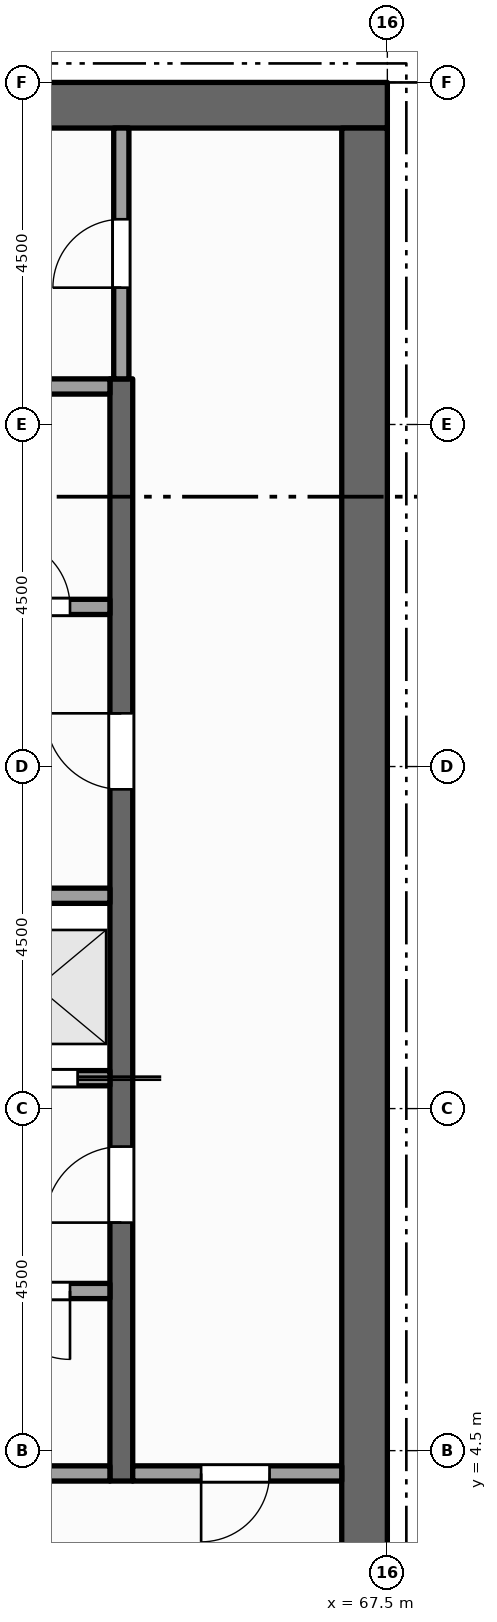
"""IFC4 building model, lengths in metres.
Left out: names, types, materials, properties, quantities, classifications, styles, units other than length and angle.
Written with IfcOpenShell. Run it as: python <this file> out.ifc"""

import sys

from ifc_helpers import new_model, si_unit, direction, frame, frame_2d, origin, place, context, subcontext, project, spatial, rectangle, extrude, element, fill, save


model = new_model("IFC4")
c1 = context("Model", 3, precision=1e-05, world=origin(), true_north=direction((0.0, 1.0)))
c2 = subcontext(c1, "Body", "Model", "MODEL_VIEW")
j1 = project(units=[si_unit("LENGTHUNIT", "METRE"), si_unit("PLANEANGLEUNIT", "RADIAN")], contexts=[c1])
p1 = place(None, origin())
s1 = spatial("IfcSite", under=j1, at=p1, CompositionType="ELEMENT")
p2 = place(p1, origin())
s2 = spatial("IfcBuilding", under=s1, at=p2, CompositionType="ELEMENT")
p3 = place(p2, frame((0.0, 0.0, 341.0)))
s3 = spatial("IfcBuildingStorey", under=s2, at=p3, CompositionType="ELEMENT", Elevation=341.0)
p4 = place(p3, frame((54.0, 22.2, -0.15), z_axis=(0.0, 0.0, 1.0), x_axis=(1.0, 0.0, 0.0)))
e1 = element("IfcWall", 1, at=p4, inside=s3, PredefinedType="SHEAR", context=c2, shape_type="SweptSolid", body=[
    extrude(rectangle(XDim=13.5, YDim=0.6, at=frame_2d((6.75, 0.0))), origin(), (0.0, 0.0, 1.0), 4.5),
])
p5 = place(p3, frame((67.2, 0.6, -0.15), z_axis=(0.0, 0.0, 1.0), x_axis=(0.0, 1.0, 0.0)))
e2 = element("IfcWall", 2, at=p5, inside=s3, PredefinedType="SHEAR", context=c2, shape_type="SweptSolid", body=[
    extrude(rectangle(XDim=21.3, YDim=0.6, at=frame_2d((10.65, 0.0))), origin(), (0.0, 0.0, 1.0), 4.5),
])
p6 = place(p3, frame((64.0, 4.1, 0.0), z_axis=(0.0, 0.0, 1.0), x_axis=(0.0, 1.0, 0.0)))
e3 = element("IfcWall", 3, at=p6, inside=s3, PredefinedType="SHEAR", context=c2, shape_type="SweptSolid", body=[
    extrude(rectangle(XDim=14.5, YDim=0.3, at=frame_2d((7.25, 0.0))), origin(), (0.0, 0.0, 1.0), 4.3),
])
p7 = place(p6, frame((3.4, 0.0, 0.0)))
e4 = element("IfcOpeningElement", 4, at=p7, cuts=e3, PredefinedType="OPENING", context=c2, shape_type="SweptSolid", body=[
    extrude(rectangle(XDim=1.0, YDim=2.1, at=frame_2d((0.5, 1.05))), frame((0.0, 0.16, 0.0), z_axis=(0.0, -1.0, 0.0), x_axis=(1.0, 0.0, 0.0)), (0.0, 0.0, 1.0), 0.32),
])
p8 = place(p6, frame((9.1, 0.0, 0.0)))
e5 = element("IfcOpeningElement", 5, at=p8, cuts=e3, PredefinedType="OPENING", context=c2, shape_type="SweptSolid", body=[
    extrude(rectangle(XDim=1.0, YDim=2.1, at=frame_2d((0.5, 1.05))), frame((0.0, 0.16, 0.0), z_axis=(0.0, -1.0, 0.0), x_axis=(1.0, 0.0, 0.0)), (0.0, 0.0, 1.0), 0.32),
])
p9 = place(p3, frame((64.0, 18.6, 0.0), z_axis=(0.0, 0.0, 1.0), x_axis=(0.0, 1.0, 0.0)))
e6 = element("IfcWall", 6, at=p9, inside=s3, PredefinedType="PARTITIONING", context=c2, shape_type="SweptSolid", body=[
    extrude(rectangle(XDim=3.3, YDim=0.2, at=frame_2d((1.65, 0.0))), origin(), (0.0, 0.0, 1.0), 4.3),
])
p10 = place(p9, frame((1.2, 0.0, 0.0)))
e7 = element("IfcOpeningElement", 7, at=p10, cuts=e6, PredefinedType="OPENING", context=c2, shape_type="SweptSolid", body=[
    extrude(rectangle(XDim=0.9, YDim=2.1, at=frame_2d((0.45, 1.05))), frame((0.0, 0.11, 0.0), z_axis=(0.0, -1.0, 0.0), x_axis=(1.0, 0.0, 0.0)), (0.0, 0.0, 1.0), 0.22),
])
p11 = place(p3, frame((61.9, 4.2, 0.0), z_axis=(0.0, 0.0, 1.0), x_axis=(1.0, 0.0, 0.0)))
e8 = element("IfcWall", 8, at=p11, inside=s3, PredefinedType="PARTITIONING", context=c2, shape_type="SweptSolid", body=[
    extrude(rectangle(XDim=1.95, YDim=0.2, at=frame_2d((0.975, 0.0))), origin(), (0.0, 0.0, 1.0), 4.3),
])
p12 = place(p3, frame((64.15, 4.2, 0.0), z_axis=(0.0, 0.0, 1.0), x_axis=(1.0, 0.0, 0.0)))
e9 = element("IfcWall", 9, at=p12, inside=s3, PredefinedType="PARTITIONING", context=c2, shape_type="SweptSolid", body=[
    extrude(rectangle(XDim=2.75, YDim=0.2, at=frame_2d((1.375, 0.0))), origin(), (0.0, 0.0, 1.0), 4.3),
])
p13 = place(p12, frame((0.9, 0.0, 0.0)))
e10 = element("IfcOpeningElement", 10, at=p13, cuts=e9, PredefinedType="OPENING", context=c2, shape_type="SweptSolid", body=[
    extrude(rectangle(XDim=0.9, YDim=2.1, at=frame_2d((0.45, 1.05))), frame((0.0, 0.11, 0.0), z_axis=(0.0, -1.0, 0.0), x_axis=(1.0, 0.0, 0.0)), (0.0, 0.0, 1.0), 0.22),
])
p14 = place(p3, frame((61.9, 6.6, 0.0), z_axis=(0.0, 0.0, 1.0), x_axis=(1.0, 0.0, 0.0)))
e11 = element("IfcWall", 11, at=p14, inside=s3, PredefinedType="PARTITIONING", context=c2, shape_type="SweptSolid", body=[
    extrude(rectangle(XDim=1.95, YDim=0.2, at=frame_2d((0.975, 0.0))), origin(), (0.0, 0.0, 1.0), 4.3),
])
p15 = place(p14, frame((0.525, 0.0, 0.0)))
e12 = element("IfcOpeningElement", 12, at=p15, cuts=e11, PredefinedType="OPENING", context=c2, shape_type="SweptSolid", body=[
    extrude(rectangle(XDim=0.9, YDim=2.1, at=frame_2d((0.45, 1.05))), frame((0.0, 0.11, 0.0), z_axis=(0.0, -1.0, 0.0), x_axis=(1.0, 0.0, 0.0)), (0.0, 0.0, 1.0), 0.22),
])
p16 = place(p3, frame((61.9, 9.4, 0.0), z_axis=(0.0, 0.0, 1.0), x_axis=(1.0, 0.0, 0.0)))
e13 = element("IfcWall", 13, at=p16, inside=s3, PredefinedType="SOLIDWALL", context=c2, shape_type="SweptSolid", body=[
    extrude(rectangle(XDim=1.95, YDim=0.2, at=frame_2d((0.975, 0.0))), origin(), (0.0, 0.0, 1.0), 4.3),
])
p17 = place(p16, frame((0.425, 0.0, 0.012)))
e14 = element("IfcOpeningElement", 14, at=p17, cuts=e13, PredefinedType="OPENING", context=c2, shape_type="SweptSolid", body=[
    extrude(rectangle(XDim=1.1, YDim=2.1, at=frame_2d((0.55, 1.05))), frame((0.0, 0.11, 0.0), z_axis=(0.0, -1.0, 0.0), x_axis=(1.0, 0.0, 0.0)), (0.0, 0.0, 1.0), 0.22),
])
p18 = place(p3, frame((61.9, 11.8, 0.0), z_axis=(0.0, 0.0, 1.0), x_axis=(1.0, 0.0, 0.0)))
e15 = element("IfcWall", 15, at=p18, inside=s3, PredefinedType="SOLIDWALL", context=c2, shape_type="SweptSolid", body=[
    extrude(rectangle(XDim=1.95, YDim=0.2, at=frame_2d((0.975, 0.0))), origin(), (0.0, 0.0, 1.0), 4.3),
])
p19 = place(p3, frame((61.9, 15.6, 0.0), z_axis=(0.0, 0.0, 1.0), x_axis=(1.0, 0.0, 0.0)))
e16 = element("IfcWall", 16, at=p19, inside=s3, PredefinedType="PARTITIONING", context=c2, shape_type="SweptSolid", body=[
    extrude(rectangle(XDim=1.95, YDim=0.2, at=frame_2d((0.975, 0.0))), origin(), (0.0, 0.0, 1.0), 4.3),
])
p20 = place(p19, frame((0.525, 0.0, 0.0)))
e17 = element("IfcOpeningElement", 17, at=p20, cuts=e16, PredefinedType="OPENING", context=c2, shape_type="SweptSolid", body=[
    extrude(rectangle(XDim=0.9, YDim=2.1, at=frame_2d((0.45, 1.05))), frame((0.0, 0.11, 0.0), z_axis=(0.0, -1.0, 0.0), x_axis=(1.0, 0.0, 0.0)), (0.0, 0.0, 1.0), 0.22),
])
p21 = place(p3, frame((61.9, 18.5, 0.0), z_axis=(0.0, 0.0, 1.0), x_axis=(1.0, 0.0, 0.0)))
e18 = element("IfcWall", 18, at=p21, inside=s3, PredefinedType="PARTITIONING", context=c2, shape_type="SweptSolid", body=[
    extrude(rectangle(XDim=1.95, YDim=0.2, at=frame_2d((0.975, 0.0))), origin(), (0.0, 0.0, 1.0), 4.3),
])
p22 = place(p17, origin())
e19 = element("IfcDoor", 19, at=p22, inside=s3, OperationType="SLIDING_TO_RIGHT", PredefinedType="DOOR", context=c2, shape_type="SweptSolid", body=[
    extrude(rectangle(XDim=1.1, YDim=2.1, at=frame_2d((0.55, 1.05))), frame((0.0, 0.025, 0.0), z_axis=(0.0, -1.0, 0.0), x_axis=(1.0, 0.0, 0.0)), (0.0, 0.0, 1.0), 0.05),
])
fill(e14, e19)
p23 = place(p7, origin())
e20 = element("IfcDoor", 20, at=p23, inside=s3, OperationType="SINGLE_SWING_LEFT", PredefinedType="DOOR", context=c2, shape_type="SweptSolid", body=[
    extrude(rectangle(XDim=1.0, YDim=2.1, at=frame_2d((0.5, 1.05))), frame((0.0, 0.025, 0.0), z_axis=(0.0, -1.0, 0.0), x_axis=(1.0, 0.0, 0.0)), (0.0, 0.0, 1.0), 0.05),
])
fill(e4, e20)
p24 = place(p8, origin())
e21 = element("IfcDoor", 21, at=p24, inside=s3, OperationType="SINGLE_SWING_RIGHT", PredefinedType="DOOR", context=c2, shape_type="SweptSolid", body=[
    extrude(rectangle(XDim=1.0, YDim=2.1, at=frame_2d((0.5, 1.05))), frame((0.0, 0.025, 0.0), z_axis=(0.0, -1.0, 0.0), x_axis=(1.0, 0.0, 0.0)), (0.0, 0.0, 1.0), 0.05),
])
fill(e5, e21)
p25 = place(p13, origin())
e22 = element("IfcDoor", 22, at=p25, inside=s3, OperationType="SINGLE_SWING_LEFT", PredefinedType="DOOR", context=c2, shape_type="SweptSolid", body=[
    extrude(rectangle(XDim=0.9, YDim=2.1, at=frame_2d((0.45, 1.05))), frame((0.0, 0.025, 0.0), z_axis=(0.0, -1.0, 0.0), x_axis=(1.0, 0.0, 0.0)), (0.0, 0.0, 1.0), 0.05),
])
fill(e10, e22)
p26 = place(p10, origin())
e23 = element("IfcDoor", 23, at=p26, inside=s3, OperationType="SINGLE_SWING_LEFT", PredefinedType="DOOR", context=c2, shape_type="SweptSolid", body=[
    extrude(rectangle(XDim=0.9, YDim=2.1, at=frame_2d((0.45, 1.05))), frame((0.0, 0.025, 0.0), z_axis=(0.0, -1.0, 0.0), x_axis=(1.0, 0.0, 0.0)), (0.0, 0.0, 1.0), 0.05),
])
fill(e7, e23)
p27 = place(p15, origin())
e24 = element("IfcDoor", 24, at=p27, inside=s3, OperationType="SINGLE_SWING_RIGHT", PredefinedType="DOOR", context=c2, shape_type="SweptSolid", body=[
    extrude(rectangle(XDim=0.9, YDim=2.1, at=frame_2d((0.45, 1.05))), frame((0.0, 0.025, 0.0), z_axis=(0.0, -1.0, 0.0), x_axis=(1.0, 0.0, 0.0)), (0.0, 0.0, 1.0), 0.05),
])
fill(e12, e24)
p28 = place(p20, origin())
e25 = element("IfcDoor", 25, at=p28, inside=s3, OperationType="SINGLE_SWING_LEFT", PredefinedType="DOOR", context=c2, shape_type="SweptSolid", body=[
    extrude(rectangle(XDim=0.9, YDim=2.1, at=frame_2d((0.45, 1.05))), frame((0.0, 0.025, 0.0), z_axis=(0.0, -1.0, 0.0), x_axis=(1.0, 0.0, 0.0)), (0.0, 0.0, 1.0), 0.05),
])
fill(e17, e25)
save(model, sys.argv[1])
